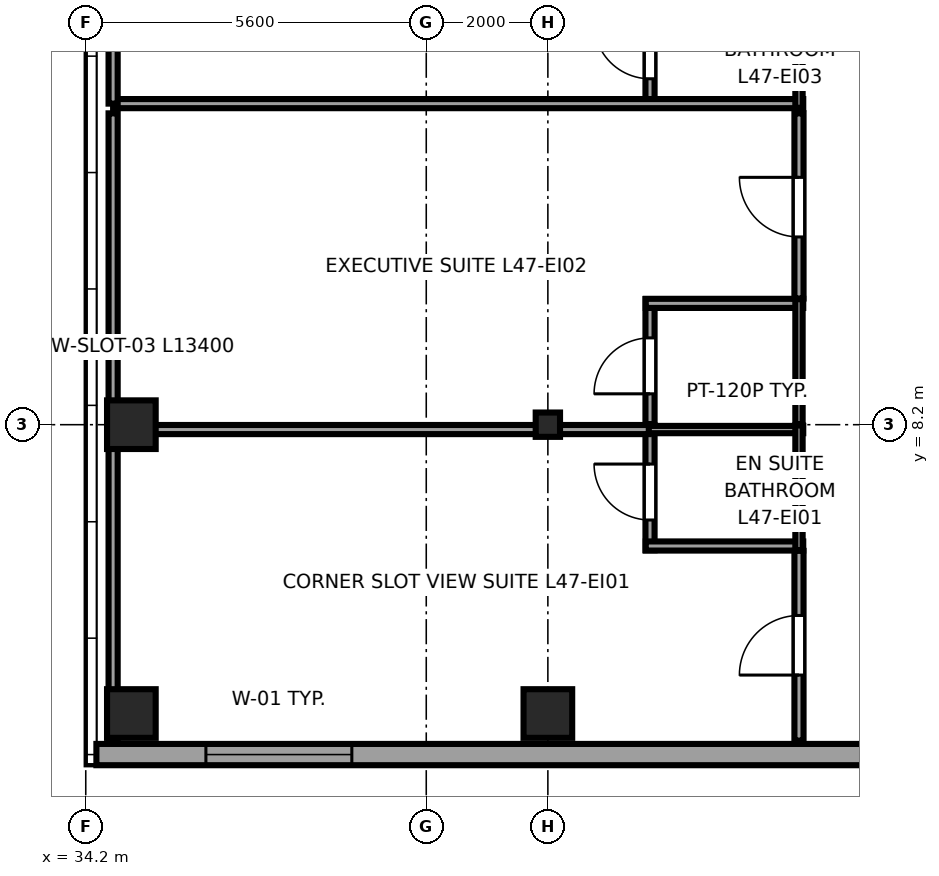
"""IFC4 building model, lengths in metres.
Left out: names, types, materials, properties, quantities, classifications, styles, units other than length and angle.
Written with IfcOpenShell. Run it as: python <this file> out.ifc"""

import sys

from ifc_helpers import new_model, si_unit, direction, frame, frame_2d, origin, origin_2d, place, context, subcontext, project, spatial, rectangle, i_section, extrude, source, transform, mapped, element, fill, save


model = new_model("IFC4")
c1 = context("Model", 3, precision=1e-05, world=origin(), true_north=direction((0.0, 1.0)))
c2 = subcontext(c1, "Body", "Model", "MODEL_VIEW")
j1 = project(units=[si_unit("LENGTHUNIT", "METRE"), si_unit("PLANEANGLEUNIT", "RADIAN")], contexts=[c1])
p1 = place(None, origin())
s1 = spatial("IfcSite", under=j1, at=p1, CompositionType="ELEMENT")
p2 = place(p1, origin())
s2 = spatial("IfcBuilding", under=s1, at=p2, CompositionType="ELEMENT")
p3 = place(p2, frame((0.0, 0.0, 179.0)))
s3 = spatial("IfcBuildingStorey", under=s2, at=p3, CompositionType="ELEMENT", Elevation=179.0)
m1 = source(origin(), c2, "Body", "SweptSolid", [
    extrude(rectangle(XDim=0.8, YDim=0.8, at=origin_2d()), origin(), (0.0, 0.0, 1.0), 3.55),
])
for number, where, z_axis, x_axis in (
    (1, (34.95, 3.45, 0.0), (0.0, 0.0, 1.0), (1.0, 0.0, 0.0)),
    (2, (34.95, 8.2, 0.0), (0.0, 0.0, 1.0), (1.0, 0.0, 0.0)),
    (3, (41.8, 3.45, 0.0), (0.0, 0.0, 1.0), (1.0, 0.0, 0.0)),
):
    element("IfcColumn", number, at=place(p3, frame(where, z_axis=z_axis, x_axis=x_axis)), inside=s3, PredefinedType="COLUMN", context=c2, shape_type="MappedRepresentation", body=[
        mapped(m1, transform((0.0, 0.0, 0.0), x_axis=(1.0, 0.0, 0.0), y_axis=(0.0, 1.0, 0.0), z_axis=(0.0, 0.0, 1.0), scale=1.0)),
    ])
m2 = source(origin(), c2, "Body", "SweptSolid", [
    extrude(i_section(OverallWidth=0.4, OverallDepth=0.4, WebThickness=0.02, FlangeThickness=0.035, at=origin_2d()), origin(), (0.0, 0.0, 1.0), 3.55),
])
p4 = place(p3, frame((41.8, 8.2, 0.0), z_axis=(0.0, 0.0, 1.0), x_axis=(1.0, 0.0, 0.0)))
e4 = element("IfcColumn", 4, at=p4, inside=s3, PredefinedType="COLUMN", context=c2, shape_type="MappedRepresentation", body=[
    mapped(m2, transform((0.0, 0.0, 0.0), x_axis=(1.0, 0.0, 0.0), y_axis=(0.0, 1.0, 0.0), z_axis=(0.0, 0.0, 1.0), scale=1.0)),
])
p5 = place(p3, frame((34.375, 2.775, 0.0), z_axis=(0.0, 0.0, 1.0), x_axis=(1.0, 0.0, 0.0)))
e5 = element("IfcWall", 5, at=p5, inside=s3, PredefinedType="SOLIDWALL", context=c2, shape_type="SweptSolid", body=[
    extrude(rectangle(XDim=15.608, YDim=0.35, at=frame_2d((7.804, 0.0))), origin(), (0.0, 0.0, 1.0), 3.25),
])
p6 = place(p5, frame((1.801, 0.0, 0.68)))
e6 = element("IfcOpeningElement", 6, at=p6, cuts=e5, PredefinedType="OPENING", context=c2, shape_type="SweptSolid", body=[
    extrude(rectangle(XDim=2.4, YDim=1.9, at=frame_2d((1.2, 0.95))), frame((0.0, 0.185, 0.0), z_axis=(0.0, -1.0, 0.0), x_axis=(1.0, 0.0, 0.0)), (0.0, 0.0, 1.0), 0.37),
])
p7 = place(p5, frame((13.866, 0.0, 0.58)))
e7 = element("IfcOpeningElement", 7, at=p7, cuts=e5, PredefinedType="OPENING", context=c2, shape_type="SweptSolid", body=[
    extrude(rectangle(XDim=1.35, YDim=1.6, at=frame_2d((0.675, 0.8))), frame((0.0, 0.185, 0.0), z_axis=(0.0, -1.0, 0.0), x_axis=(1.0, 0.0, 0.0)), (0.0, 0.0, 1.0), 0.37),
])
p8 = place(p3, frame((43.48, 6.135, 0.0), z_axis=(0.0, 0.0, 1.0), x_axis=(0.0, 1.0, 0.0)))
e8 = element("IfcWall", 8, at=p8, inside=s3, PredefinedType="PARTITIONING", context=c2, shape_type="SweptSolid", body=[
    extrude(rectangle(XDim=2.055, YDim=0.15, at=frame_2d((1.027, 0.0))), origin(), (0.0, 0.0, 1.0), 3.25),
])
p9 = place(p8, frame((0.498, 0.0, 0.0)))
e9 = element("IfcOpeningElement", 9, at=p9, cuts=e8, PredefinedType="OPENING", context=c2, shape_type="SweptSolid", body=[
    extrude(rectangle(XDim=0.92, YDim=2.01, at=frame_2d((0.46, 1.005))), frame((0.0, 0.085, 0.0), z_axis=(0.0, -1.0, 0.0), x_axis=(1.0, 0.0, 0.0)), (0.0, 0.0, 1.0), 0.17),
])
p10 = place(p3, frame((43.41, 6.205, 0.0), z_axis=(0.0, 0.0, 1.0), x_axis=(1.0, 0.0, 0.0)))
e10 = element("IfcWall", 10, at=p10, inside=s3, PredefinedType="PARTITIONING", context=c2, shape_type="SweptSolid", body=[
    extrude(rectangle(XDim=2.59, YDim=0.15, at=frame_2d((1.295, 0.0))), origin(), (0.0, 0.0, 1.0), 3.25),
])
p11 = place(p3, frame((43.41, 8.12, 0.0), z_axis=(0.0, 0.0, 1.0), x_axis=(1.0, 0.0, 0.0)))
e11 = element("IfcWall", 11, at=p11, inside=s3, PredefinedType="PLUMBINGWALL", context=c2, shape_type="SweptSolid", body=[
    extrude(rectangle(XDim=2.59, YDim=0.12, at=frame_2d((1.295, 0.0))), origin(), (0.0, 0.0, 1.0), 2.638),
])
p12 = place(p3, frame((45.93, 6.135, 0.0), z_axis=(0.0, 0.0, 1.0), x_axis=(0.0, 1.0, 0.0)))
e12 = element("IfcWall", 12, at=p12, inside=s3, PredefinedType="PLUMBINGWALL", context=c2, shape_type="SweptSolid", body=[
    extrude(rectangle(XDim=2.055, YDim=0.12, at=frame_2d((1.027, 0.0))), origin(), (0.0, 0.0, 1.0), 3.25),
])
p13 = place(p3, frame((43.48, 8.21, 0.0), z_axis=(0.0, 0.0, 1.0), x_axis=(0.0, 1.0, 0.0)))
e13 = element("IfcWall", 13, at=p13, inside=s3, PredefinedType="PARTITIONING", context=c2, shape_type="SweptSolid", body=[
    extrude(rectangle(XDim=2.055, YDim=0.15, at=frame_2d((1.027, 0.0))), origin(), (0.0, 0.0, 1.0), 3.25),
])
p14 = place(p13, frame((0.498, 0.0, 0.0)))
e14 = element("IfcOpeningElement", 14, at=p14, cuts=e13, PredefinedType="OPENING", context=c2, shape_type="SweptSolid", body=[
    extrude(rectangle(XDim=0.92, YDim=2.01, at=frame_2d((0.46, 1.005))), frame((0.0, 0.085, 0.0), z_axis=(0.0, -1.0, 0.0), x_axis=(1.0, 0.0, 0.0)), (0.0, 0.0, 1.0), 0.17),
])
p15 = place(p3, frame((43.41, 10.195, 0.0), z_axis=(0.0, 0.0, 1.0), x_axis=(1.0, 0.0, 0.0)))
e15 = element("IfcWall", 15, at=p15, inside=s3, PredefinedType="PARTITIONING", context=c2, shape_type="SweptSolid", body=[
    extrude(rectangle(XDim=2.59, YDim=0.15, at=frame_2d((1.295, 0.0))), origin(), (0.0, 0.0, 1.0), 3.25),
])
p16 = place(p3, frame((45.93, 8.21, 0.0), z_axis=(0.0, 0.0, 1.0), x_axis=(0.0, 1.0, 0.0)))
e16 = element("IfcWall", 16, at=p16, inside=s3, PredefinedType="PLUMBINGWALL", context=c2, shape_type="SweptSolid", body=[
    extrude(rectangle(XDim=2.055, YDim=0.12, at=frame_2d((1.027, 0.0))), origin(), (0.0, 0.0, 1.0), 3.25),
])
p17 = place(p3, frame((43.48, 13.41, 0.0), z_axis=(0.0, 0.0, 1.0), x_axis=(0.0, 1.0, 0.0)))
e17 = element("IfcWall", 17, at=p17, inside=s3, PredefinedType="PARTITIONING", context=c2, shape_type="SweptSolid", body=[
    extrude(rectangle(XDim=2.017, YDim=0.15, at=frame_2d((1.009, 0.0))), origin(), (0.0, 0.0, 1.0), 3.25),
])
p18 = place(p17, frame((0.479, 0.0, 0.0)))
e18 = element("IfcOpeningElement", 18, at=p18, cuts=e17, PredefinedType="OPENING", context=c2, shape_type="SweptSolid", body=[
    extrude(rectangle(XDim=0.92, YDim=2.01, at=frame_2d((0.46, 1.005))), frame((0.0, 0.085, 0.0), z_axis=(0.0, -1.0, 0.0), x_axis=(1.0, 0.0, 0.0)), (0.0, 0.0, 1.0), 0.17),
])
p19 = place(p3, frame((34.65, 13.48, 0.0), z_axis=(0.0, 0.0, 1.0), x_axis=(1.0, 0.0, 0.0)))
e19 = element("IfcWall", 19, at=p19, inside=s3, PredefinedType="PARTITIONING", context=c2, shape_type="SweptSolid", body=[
    extrude(rectangle(XDim=11.35, YDim=0.15, at=frame_2d((5.675, 0.0))), origin(), (0.0, 0.0, 1.0), 3.25),
])
p20 = place(p3, frame((45.93, 13.41, 0.0), z_axis=(0.0, 0.0, 1.0), x_axis=(0.0, 1.0, 0.0)))
e20 = element("IfcWall", 20, at=p20, inside=s3, PredefinedType="PLUMBINGWALL", context=c2, shape_type="SweptSolid", body=[
    extrude(rectangle(XDim=2.017, YDim=0.12, at=frame_2d((1.009, 0.0))), origin(), (0.0, 0.0, 1.0), 3.25),
])
p21 = place(p3, frame((45.93, 3.005, 0.0), z_axis=(0.0, 0.0, 1.0), x_axis=(0.0, 1.0, 0.0)))
e21 = element("IfcWall", 21, at=p21, inside=s3, PredefinedType="PARTITIONING", context=c2, shape_type="SweptSolid", body=[
    extrude(rectangle(XDim=3.12, YDim=0.15, at=frame_2d((1.56, 0.0))), origin(), (0.0, 0.0, 1.0), 3.25),
])
p22 = place(p21, frame((1.077, 0.0, 0.0)))
e22 = element("IfcOpeningElement", 22, at=p22, cuts=e21, PredefinedType="OPENING", context=c2, shape_type="SweptSolid", body=[
    extrude(rectangle(XDim=0.98, YDim=2.12, at=frame_2d((0.49, 1.06))), frame((0.0, 0.085, 0.0), z_axis=(0.0, -1.0, 0.0), x_axis=(1.0, 0.0, 0.0)), (0.0, 0.0, 1.0), 0.17),
])
p23 = place(p3, frame((34.65, 8.12, 0.0), z_axis=(0.0, 0.0, 1.0), x_axis=(1.0, 0.0, 0.0)))
e23 = element("IfcWall", 23, at=p23, inside=s3, PredefinedType="PARTITIONING", context=c2, shape_type="SweptSolid", body=[
    extrude(rectangle(XDim=8.81, YDim=0.15, at=frame_2d((4.405, 0.0))), origin(), (0.0, 0.0, 1.0), 2.638),
])
p24 = place(p3, frame((34.65, 3.005, 0.0), z_axis=(0.0, 0.0, 1.0), x_axis=(0.0, 1.0, 0.0)))
e24 = element("IfcWall", 24, at=p24, inside=s3, PredefinedType="PARTITIONING", context=c2, shape_type="SweptSolid", body=[
    extrude(rectangle(XDim=5.115, YDim=0.15, at=frame_2d((2.558, 0.0))), origin(), (0.0, 0.0, 1.0), 3.25),
])
p25 = place(p3, frame((45.93, 10.275, 0.0), z_axis=(0.0, 0.0, 1.0), x_axis=(0.0, 1.0, 0.0)))
e25 = element("IfcWall", 25, at=p25, inside=s3, PredefinedType="PARTITIONING", context=c2, shape_type="SweptSolid", body=[
    extrude(rectangle(XDim=3.045, YDim=0.15, at=frame_2d((1.522, 0.0))), origin(), (0.0, 0.0, 1.0), 3.25),
])
p26 = place(p25, frame((1.012, 0.0, 0.0)))
e26 = element("IfcOpeningElement", 26, at=p26, cuts=e25, PredefinedType="OPENING", context=c2, shape_type="SweptSolid", body=[
    extrude(rectangle(XDim=0.98, YDim=2.12, at=frame_2d((0.49, 1.06))), frame((0.0, 0.085, 0.0), z_axis=(0.0, -1.0, 0.0), x_axis=(1.0, 0.0, 0.0)), (0.0, 0.0, 1.0), 0.17),
])
p27 = place(p3, frame((34.65, 8.28, 0.0), z_axis=(0.0, 0.0, 1.0), x_axis=(0.0, 1.0, 0.0)))
e27 = element("IfcWall", 27, at=p27, inside=s3, PredefinedType="PARTITIONING", context=c2, shape_type="SweptSolid", body=[
    extrude(rectangle(XDim=5.04, YDim=0.15, at=frame_2d((2.52, 0.0))), origin(), (0.0, 0.0, 1.0), 3.25),
])
p28 = place(p3, frame((34.65, 13.48, 0.0), z_axis=(0.0, 0.0, 1.0), x_axis=(0.0, 1.0, 0.0)))
e28 = element("IfcWall", 28, at=p28, inside=s3, PredefinedType="PARTITIONING", context=c2, shape_type="SweptSolid", body=[
    extrude(rectangle(XDim=4.94, YDim=0.15, at=frame_2d((2.47, 0.0))), origin(), (0.0, 0.0, 1.0), 3.25),
])
m3 = source(origin(), c2, "Body", "SweptSolid", [
    extrude(rectangle(XDim=2.4, YDim=1.9, at=frame_2d((1.2, 0.95))), frame((0.0, 0.09, 0.0), z_axis=(0.0, -1.0, 0.0), x_axis=(1.0, 0.0, 0.0)), (0.0, 0.0, 1.0), 0.06),
])
p29 = place(p6, origin())
e29 = element("IfcWindow", 29, at=p29, inside=s3, PartitioningType="TRIPLE_PANEL_HORIZONTAL", PredefinedType="WINDOW", context=c2, shape_type="MappedRepresentation", body=[
    mapped(m3, transform((0.0, 0.0, 0.0), x_axis=(1.0, 0.0, 0.0), y_axis=(0.0, 1.0, 0.0), z_axis=(0.0, 0.0, 1.0), scale=1.0)),
])
fill(e6, e29)
m4 = source(origin(), c2, "Body", "SweptSolid", [
    extrude(rectangle(XDim=0.92, YDim=2.01, at=frame_2d((0.46, 1.005))), frame((0.0, 0.025, 0.0), z_axis=(0.0, -1.0, 0.0), x_axis=(1.0, 0.0, 0.0)), (0.0, 0.0, 1.0), 0.05),
])
p30 = place(p9, origin())
e30 = element("IfcDoor", 30, at=p30, inside=s3, OperationType="SINGLE_SWING_RIGHT", PredefinedType="DOOR", context=c2, shape_type="MappedRepresentation", body=[
    mapped(m4, transform((0.0, 0.0, 0.0), x_axis=(1.0, 0.0, 0.0), y_axis=(0.0, 1.0, 0.0), z_axis=(0.0, 0.0, 1.0), scale=1.0)),
])
fill(e9, e30)
p31 = place(p14, origin())
e31 = element("IfcDoor", 31, at=p31, inside=s3, OperationType="SINGLE_SWING_LEFT", PredefinedType="DOOR", context=c2, shape_type="MappedRepresentation", body=[
    mapped(m4, transform((0.0, 0.0, 0.0), x_axis=(1.0, 0.0, 0.0), y_axis=(0.0, 1.0, 0.0), z_axis=(0.0, 0.0, 1.0), scale=1.0)),
])
fill(e14, e31)
p32 = place(p18, origin())
e32 = element("IfcDoor", 32, at=p32, inside=s3, OperationType="SINGLE_SWING_RIGHT", PredefinedType="DOOR", context=c2, shape_type="MappedRepresentation", body=[
    mapped(m4, transform((0.0, 0.0, 0.0), x_axis=(1.0, 0.0, 0.0), y_axis=(0.0, 1.0, 0.0), z_axis=(0.0, 0.0, 1.0), scale=1.0)),
])
fill(e18, e32)
m5 = source(origin(), c2, "Body", "SweptSolid", [
    extrude(rectangle(XDim=0.98, YDim=2.12, at=frame_2d((0.49, 1.06))), frame((0.0, 0.025, 0.0), z_axis=(0.0, -1.0, 0.0), x_axis=(1.0, 0.0, 0.0)), (0.0, 0.0, 1.0), 0.05),
])
p33 = place(p22, origin())
e33 = element("IfcDoor", 33, at=p33, inside=s3, OperationType="SINGLE_SWING_LEFT", PredefinedType="DOOR", context=c2, shape_type="MappedRepresentation", body=[
    mapped(m5, transform((0.0, 0.0, 0.0), x_axis=(1.0, 0.0, 0.0), y_axis=(0.0, 1.0, 0.0), z_axis=(0.0, 0.0, 1.0), scale=1.0)),
])
fill(e22, e33)
p34 = place(p26, origin())
e34 = element("IfcDoor", 34, at=p34, inside=s3, OperationType="SINGLE_SWING_RIGHT", PredefinedType="DOOR", context=c2, shape_type="MappedRepresentation", body=[
    mapped(m5, transform((0.0, 0.0, 0.0), x_axis=(1.0, 0.0, 0.0), y_axis=(0.0, 1.0, 0.0), z_axis=(0.0, 0.0, 1.0), scale=1.0)),
])
fill(e26, e34)
save(model, sys.argv[1])
